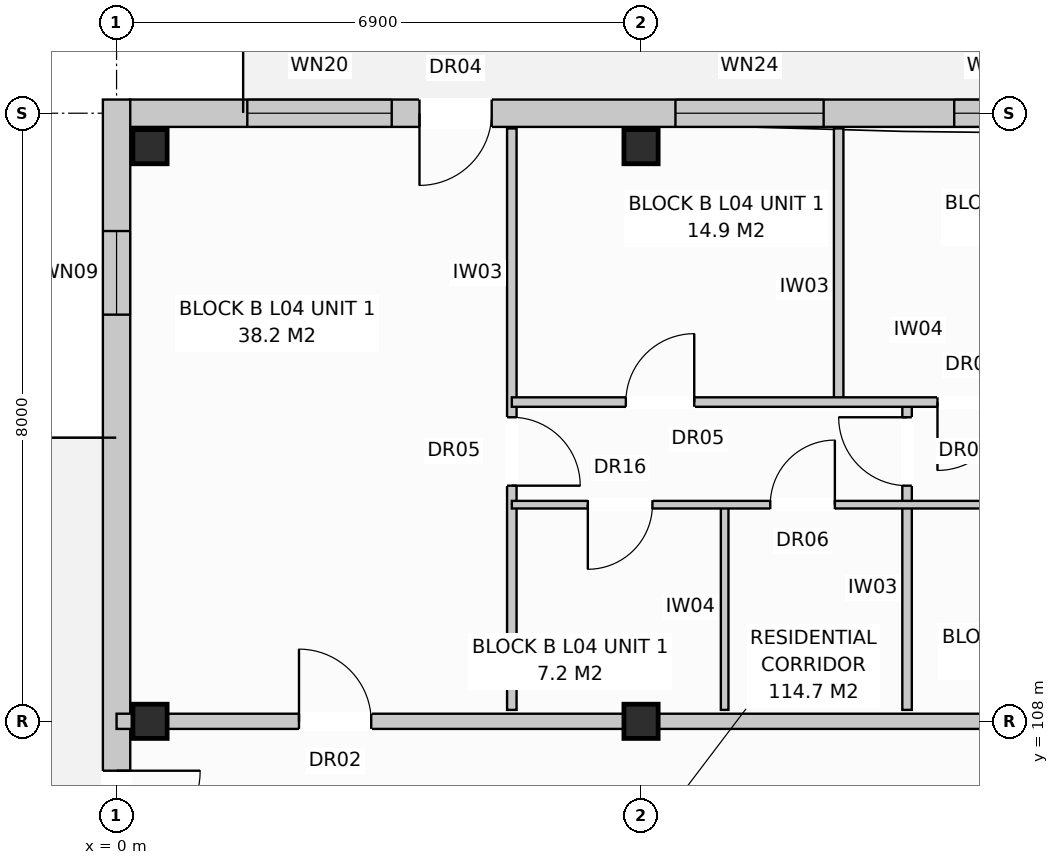
"""IFC4 building model, lengths in metres.
Left out: names, types, materials, properties, quantities, classifications, styles, units other than length and angle.
Written with IfcOpenShell. Run it as: python <this file> out.ifc"""

import sys

from ifc_helpers import new_model, si_unit, direction, frame, frame_2d, origin, origin_with_axes, origin_2d, place, context, subcontext, project, spatial, rectangle, extrude, element, fill, save


model = new_model("IFC4")
c1 = context("Model", 3, precision=1e-05, world=origin(), true_north=direction((0.0, 1.0)))
c2 = subcontext(c1, "Body", "Model", "MODEL_VIEW")
j1 = project(units=[si_unit("LENGTHUNIT", "METRE"), si_unit("PLANEANGLEUNIT", "RADIAN")], contexts=[c1])
p1 = place(None, origin())
s1 = spatial("IfcSite", under=j1, at=p1, CompositionType="ELEMENT")
p2 = place(p1, origin())
s2 = spatial("IfcBuilding", under=s1, at=p2, CompositionType="ELEMENT")
p3 = place(p2, frame((0.0, 0.0, 14.4)))
s3 = spatial("IfcBuildingStorey", under=s2, at=p3, CompositionType="ELEMENT", Elevation=14.4)
for number, where, z_axis, x_axis in (
    (1, (0.44, 108.0, 0.0), (0.0, 0.0, 1.0), (1.0, 0.0, 0.0)),
    (2, (0.44, 115.56, 0.0), (0.0, 0.0, 1.0), (1.0, 0.0, 0.0)),
    (3, (6.9, 108.0, 0.0), (0.0, 0.0, 1.0), (1.0, 0.0, 0.0)),
    (4, (6.9, 115.56, 0.0), (0.0, 0.0, 1.0), (1.0, 0.0, 0.0)),
):
    element("IfcColumn", number, at=place(p3, frame(where, z_axis=z_axis, x_axis=x_axis)), inside=s3, PredefinedType="COLUMN", context=c2, shape_type="SweptSolid", body=[
        extrude(rectangle(XDim=0.45, YDim=0.45, at=origin_2d()), origin(), (0.0, 0.0, 1.0), 3.2),
    ])
p4 = place(p3, frame((0.17, 116.0, 0.0), z_axis=(0.0, 0.0, 1.0), x_axis=(1.0, 0.0, 0.0)))
e5 = element("IfcWall", 5, at=p4, inside=s3, PredefinedType="STANDARD", context=c2, shape_type="SweptSolid", body=[
    extrude(rectangle(XDim=54.86, YDim=0.36, at=frame_2d((27.43, 0.0))), origin(), (0.0, 0.0, 1.0), 2.94),
])
p5 = place(p4, frame((3.815, 0.0, 0.0)))
e6 = element("IfcOpeningElement", 6, at=p5, cuts=e5, PredefinedType="OPENING", context=c2, shape_type="SweptSolid", body=[
    extrude(rectangle(XDim=0.95, YDim=2.1, at=frame_2d((0.475, 1.05))), frame((0.0, 0.192, 0.0), z_axis=(0.0, -1.0, 0.0), x_axis=(1.0, 0.0, 0.0)), (0.0, 0.0, 1.0), 0.384),
])
p6 = place(p4, frame((16.615, 0.0, 0.0)))
e7 = element("IfcOpeningElement", 7, at=p6, cuts=e5, PredefinedType="OPENING", context=c2, shape_type="SweptSolid", body=[
    extrude(rectangle(XDim=0.95, YDim=2.1, at=frame_2d((0.475, 1.05))), frame((0.0, 0.192, 0.0), z_axis=(0.0, -1.0, 0.0), x_axis=(1.0, 0.0, 0.0)), (0.0, 0.0, 1.0), 0.384),
])
p7 = place(p4, frame((30.115, 0.0, 0.0)))
e8 = element("IfcOpeningElement", 8, at=p7, cuts=e5, PredefinedType="OPENING", context=c2, shape_type="SweptSolid", body=[
    extrude(rectangle(XDim=0.95, YDim=2.1, at=frame_2d((0.475, 1.05))), frame((0.0, 0.192, 0.0), z_axis=(0.0, -1.0, 0.0), x_axis=(1.0, 0.0, 0.0)), (0.0, 0.0, 1.0), 0.384),
])
p8 = place(p4, frame((45.228, 0.0, 0.0)))
e9 = element("IfcOpeningElement", 9, at=p8, cuts=e5, PredefinedType="OPENING", context=c2, shape_type="SweptSolid", body=[
    extrude(rectangle(XDim=0.95, YDim=2.1, at=frame_2d((0.475, 1.05))), frame((0.0, 0.192, 0.0), z_axis=(0.0, -1.0, 0.0), x_axis=(1.0, 0.0, 0.0)), (0.0, 0.0, 1.0), 0.384),
])
p9 = place(p4, frame((1.55, 0.0, 0.8)))
e10 = element("IfcOpeningElement", 10, at=p9, cuts=e5, PredefinedType="OPENING", context=c2, shape_type="SweptSolid", body=[
    extrude(rectangle(XDim=1.9, YDim=1.85, at=frame_2d((0.95, 0.925))), frame((0.0, 0.192, 0.0), z_axis=(0.0, -1.0, 0.0), x_axis=(1.0, 0.0, 0.0)), (0.0, 0.0, 1.0), 0.384),
])
p10 = place(p4, frame((7.183, 0.0, 0.8)))
e11 = element("IfcOpeningElement", 11, at=p10, cuts=e5, PredefinedType="OPENING", context=c2, shape_type="SweptSolid", body=[
    extrude(rectangle(XDim=1.95, YDim=1.65, at=frame_2d((0.975, 0.825))), frame((0.0, 0.192, 0.0), z_axis=(0.0, -1.0, 0.0), x_axis=(1.0, 0.0, 0.0)), (0.0, 0.0, 1.0), 0.384),
])
p11 = place(p4, frame((10.85, 0.0, 0.72)))
e12 = element("IfcOpeningElement", 12, at=p11, cuts=e5, PredefinedType="OPENING", context=c2, shape_type="SweptSolid", body=[
    extrude(rectangle(XDim=1.1, YDim=1.5, at=frame_2d((0.55, 0.75))), frame((0.0, 0.192, 0.0), z_axis=(0.0, -1.0, 0.0), x_axis=(1.0, 0.0, 0.0)), (0.0, 0.0, 1.0), 0.384),
])
p12 = place(p4, frame((14.85, 0.0, 0.72)))
e13 = element("IfcOpeningElement", 13, at=p12, cuts=e5, PredefinedType="OPENING", context=c2, shape_type="SweptSolid", body=[
    extrude(rectangle(XDim=1.1, YDim=1.5, at=frame_2d((0.55, 0.75))), frame((0.0, 0.192, 0.0), z_axis=(0.0, -1.0, 0.0), x_axis=(1.0, 0.0, 0.0)), (0.0, 0.0, 1.0), 0.384),
])
p13 = place(p4, frame((18.125, 0.0, 0.8)))
e14 = element("IfcOpeningElement", 14, at=p13, cuts=e5, PredefinedType="OPENING", context=c2, shape_type="SweptSolid", body=[
    extrude(rectangle(XDim=1.95, YDim=1.65, at=frame_2d((0.975, 0.825))), frame((0.0, 0.192, 0.0), z_axis=(0.0, -1.0, 0.0), x_axis=(1.0, 0.0, 0.0)), (0.0, 0.0, 1.0), 0.384),
])
p14 = place(p4, frame((23.9, 0.0, 0.8)))
e15 = element("IfcOpeningElement", 15, at=p14, cuts=e5, PredefinedType="OPENING", context=c2, shape_type="SweptSolid", body=[
    extrude(rectangle(XDim=1.8, YDim=1.7, at=frame_2d((0.9, 0.85))), frame((0.0, 0.192, 0.0), z_axis=(0.0, -1.0, 0.0), x_axis=(1.0, 0.0, 0.0)), (0.0, 0.0, 1.0), 0.384),
])
p15 = place(p4, frame((28.35, 0.0, 0.72)))
e16 = element("IfcOpeningElement", 16, at=p15, cuts=e5, PredefinedType="OPENING", context=c2, shape_type="SweptSolid", body=[
    extrude(rectangle(XDim=1.1, YDim=1.5, at=frame_2d((0.55, 0.75))), frame((0.0, 0.192, 0.0), z_axis=(0.0, -1.0, 0.0), x_axis=(1.0, 0.0, 0.0)), (0.0, 0.0, 1.0), 0.384),
])
p16 = place(p4, frame((31.825, 0.0, 0.8)))
e17 = element("IfcOpeningElement", 17, at=p16, cuts=e5, PredefinedType="OPENING", context=c2, shape_type="SweptSolid", body=[
    extrude(rectangle(XDim=1.95, YDim=1.65, at=frame_2d((0.975, 0.825))), frame((0.0, 0.192, 0.0), z_axis=(0.0, -1.0, 0.0), x_axis=(1.0, 0.0, 0.0)), (0.0, 0.0, 1.0), 0.384),
])
p17 = place(p4, frame((35.4, 0.0, 0.8)))
e18 = element("IfcOpeningElement", 18, at=p17, cuts=e5, PredefinedType="OPENING", context=c2, shape_type="SweptSolid", body=[
    extrude(rectangle(XDim=1.8, YDim=1.7, at=frame_2d((0.9, 0.85))), frame((0.0, 0.192, 0.0), z_axis=(0.0, -1.0, 0.0), x_axis=(1.0, 0.0, 0.0)), (0.0, 0.0, 1.0), 0.384),
])
p18 = place(p4, frame((39.15, 0.0, 0.72)))
e19 = element("IfcOpeningElement", 19, at=p18, cuts=e5, PredefinedType="OPENING", context=c2, shape_type="SweptSolid", body=[
    extrude(rectangle(XDim=1.1, YDim=1.5, at=frame_2d((0.55, 0.75))), frame((0.0, 0.192, 0.0), z_axis=(0.0, -1.0, 0.0), x_axis=(1.0, 0.0, 0.0)), (0.0, 0.0, 1.0), 0.384),
])
p19 = place(p4, frame((43.35, 0.0, 0.72)))
e20 = element("IfcOpeningElement", 20, at=p19, cuts=e5, PredefinedType="OPENING", context=c2, shape_type="SweptSolid", body=[
    extrude(rectangle(XDim=1.1, YDim=1.5, at=frame_2d((0.55, 0.75))), frame((0.0, 0.192, 0.0), z_axis=(0.0, -1.0, 0.0), x_axis=(1.0, 0.0, 0.0)), (0.0, 0.0, 1.0), 0.384),
])
p20 = place(p4, frame((48.7, 0.0, 0.8)))
e21 = element("IfcOpeningElement", 21, at=p20, cuts=e5, PredefinedType="OPENING", context=c2, shape_type="SweptSolid", body=[
    extrude(rectangle(XDim=1.8, YDim=1.7, at=frame_2d((0.9, 0.85))), frame((0.0, 0.192, 0.0), z_axis=(0.0, -1.0, 0.0), x_axis=(1.0, 0.0, 0.0)), (0.0, 0.0, 1.0), 0.384),
])
p21 = place(p4, frame((52.25, 0.0, 0.72)))
e22 = element("IfcOpeningElement", 22, at=p21, cuts=e5, PredefinedType="OPENING", context=c2, shape_type="SweptSolid", body=[
    extrude(rectangle(XDim=1.1, YDim=1.5, at=frame_2d((0.55, 0.75))), frame((0.0, 0.192, 0.0), z_axis=(0.0, -1.0, 0.0), x_axis=(1.0, 0.0, 0.0)), (0.0, 0.0, 1.0), 0.384),
])
p22 = place(p3, frame((0.0, 97.42, 0.0), z_axis=(0.0, 0.0, 1.0), x_axis=(0.0, 1.0, 0.0)))
e23 = element("IfcWall", 23, at=p22, inside=s3, PredefinedType="STANDARD", context=c2, shape_type="SweptSolid", body=[
    extrude(rectangle(XDim=18.76, YDim=0.36, at=frame_2d((9.38, 0.0))), origin(), (0.0, 0.0, 1.0), 2.94),
])
p23 = place(p22, frame((8.83, 0.0, 0.0)))
e24 = element("IfcOpeningElement", 24, at=p23, cuts=e23, PredefinedType="OPENING", context=c2, shape_type="SweptSolid", body=[
    extrude(rectangle(XDim=1.1, YDim=2.1, at=frame_2d((0.55, 1.05))), frame((0.0, 0.192, 0.0), z_axis=(0.0, -1.0, 0.0), x_axis=(1.0, 0.0, 0.0)), (0.0, 0.0, 1.0), 0.384),
])
p24 = place(p22, frame((1.73, 0.0, 0.72)))
e25 = element("IfcOpeningElement", 25, at=p24, cuts=e23, PredefinedType="OPENING", context=c2, shape_type="SweptSolid", body=[
    extrude(rectangle(XDim=1.1, YDim=1.5, at=frame_2d((0.55, 0.75))), frame((0.0, 0.192, 0.0), z_axis=(0.0, -1.0, 0.0), x_axis=(1.0, 0.0, 0.0)), (0.0, 0.0, 1.0), 0.384),
])
p25 = place(p22, frame((15.93, 0.0, 0.72)))
e26 = element("IfcOpeningElement", 26, at=p25, cuts=e23, PredefinedType="OPENING", context=c2, shape_type="SweptSolid", body=[
    extrude(rectangle(XDim=1.1, YDim=1.5, at=frame_2d((0.55, 0.75))), frame((0.0, 0.192, 0.0), z_axis=(0.0, -1.0, 0.0), x_axis=(1.0, 0.0, 0.0)), (0.0, 0.0, 1.0), 0.384),
])
p26 = place(p3, frame((0.0, 108.0, 0.0), z_axis=(0.0, 0.0, 1.0), x_axis=(1.0, 0.0, 0.0)))
e27 = element("IfcWall", 27, at=p26, inside=s3, PredefinedType="PARTITIONING", context=c2, shape_type="SweptSolid", body=[
    extrude(rectangle(XDim=13.8, YDim=0.2, at=frame_2d((6.9, 0.0))), origin(), (0.0, 0.0, 1.0), 2.38),
])
p27 = place(p26, frame((2.4, 0.0, 0.0)))
e28 = element("IfcOpeningElement", 28, at=p27, cuts=e27, PredefinedType="OPENING", context=c2, shape_type="SweptSolid", body=[
    extrude(rectangle(XDim=0.95, YDim=2.15, at=frame_2d((0.475, 1.075))), frame((0.0, 0.112, 0.0), z_axis=(0.0, -1.0, 0.0), x_axis=(1.0, 0.0, 0.0)), (0.0, 0.0, 1.0), 0.224),
])
p28 = place(p3, frame((5.2, 108.15, 0.0), z_axis=(0.0, 0.0, 1.0), x_axis=(0.0, 1.0, 0.0)))
e29 = element("IfcWall", 29, at=p28, inside=s3, PredefinedType="PARTITIONING", context=c2, shape_type="SweptSolid", body=[
    extrude(rectangle(XDim=7.65, YDim=0.125, at=frame_2d((3.825, 0.0))), origin(), (0.0, 0.0, 1.0), 2.94),
])
p29 = place(p28, frame((2.95, 0.0, 0.0)))
e30 = element("IfcOpeningElement", 30, at=p29, cuts=e29, PredefinedType="OPENING", context=c2, shape_type="SweptSolid", body=[
    extrude(rectangle(XDim=0.9, YDim=2.1, at=frame_2d((0.45, 1.05))), frame((0.0, 0.074, 0.0), z_axis=(0.0, -1.0, 0.0), x_axis=(1.0, 0.0, 0.0)), (0.0, 0.0, 1.0), 0.149),
])
p30 = place(p3, frame((8.0, 108.15, 0.0), z_axis=(0.0, 0.0, 1.0), x_axis=(0.0, 1.0, 0.0)))
e31 = element("IfcWall", 31, at=p30, inside=s3, PredefinedType="PARTITIONING", context=c2, shape_type="SweptSolid", body=[
    extrude(rectangle(XDim=2.7, YDim=0.1, at=frame_2d((1.35, 0.0))), origin(), (0.0, 0.0, 1.0), 2.94),
])
p31 = place(p3, frame((10.4, 108.15, 0.0), z_axis=(0.0, 0.0, 1.0), x_axis=(0.0, 1.0, 0.0)))
e32 = element("IfcWall", 32, at=p31, inside=s3, PredefinedType="PARTITIONING", context=c2, shape_type="SweptSolid", body=[
    extrude(rectangle(XDim=4.05, YDim=0.125, at=frame_2d((2.025, 0.0))), origin(), (0.0, 0.0, 1.0), 2.94),
])
p32 = place(p31, frame((2.95, 0.0, 0.0)))
e33 = element("IfcOpeningElement", 33, at=p32, cuts=e32, PredefinedType="OPENING", context=c2, shape_type="SweptSolid", body=[
    extrude(rectangle(XDim=0.9, YDim=2.1, at=frame_2d((0.45, 1.05))), frame((0.0, 0.074, 0.0), z_axis=(0.0, -1.0, 0.0), x_axis=(1.0, 0.0, 0.0)), (0.0, 0.0, 1.0), 0.149),
])
p33 = place(p3, frame((9.5, 112.2, 0.0), z_axis=(0.0, 0.0, 1.0), x_axis=(0.0, 1.0, 0.0)))
e34 = element("IfcWall", 34, at=p33, inside=s3, PredefinedType="PARTITIONING", context=c2, shape_type="SweptSolid", body=[
    extrude(rectangle(XDim=3.6, YDim=0.125, at=frame_2d((1.8, 0.0))), origin(), (0.0, 0.0, 1.0), 2.94),
])
p34 = place(p3, frame((5.2, 110.85, 0.0), z_axis=(0.0, 0.0, 1.0), x_axis=(1.0, 0.0, 0.0)))
e35 = element("IfcWall", 35, at=p34, inside=s3, PredefinedType="PARTITIONING", context=c2, shape_type="SweptSolid", body=[
    extrude(rectangle(XDim=8.5, YDim=0.1, at=frame_2d((4.25, 0.0))), origin(), (0.0, 0.0, 1.0), 2.94),
])
p35 = place(p34, frame((1.0, 0.0, 0.0)))
e36 = element("IfcOpeningElement", 36, at=p35, cuts=e35, PredefinedType="OPENING", context=c2, shape_type="SweptSolid", body=[
    extrude(rectangle(XDim=0.85, YDim=2.1, at=frame_2d((0.425, 1.05))), frame((0.0, 0.062, 0.0), z_axis=(0.0, -1.0, 0.0), x_axis=(1.0, 0.0, 0.0)), (0.0, 0.0, 1.0), 0.124),
])
p36 = place(p34, frame((3.4, 0.0, 0.0)))
e37 = element("IfcOpeningElement", 37, at=p36, cuts=e35, PredefinedType="OPENING", context=c2, shape_type="SweptSolid", body=[
    extrude(rectangle(XDim=0.85, YDim=2.05, at=frame_2d((0.425, 1.025))), frame((0.0, 0.062, 0.0), z_axis=(0.0, -1.0, 0.0), x_axis=(1.0, 0.0, 0.0)), (0.0, 0.0, 1.0), 0.124),
])
p37 = place(p34, frame((6.2, 0.0, 0.0)))
e38 = element("IfcOpeningElement", 38, at=p37, cuts=e35, PredefinedType="OPENING", context=c2, shape_type="SweptSolid", body=[
    extrude(rectangle(XDim=0.85, YDim=2.05, at=frame_2d((0.425, 1.025))), frame((0.0, 0.062, 0.0), z_axis=(0.0, -1.0, 0.0), x_axis=(1.0, 0.0, 0.0)), (0.0, 0.0, 1.0), 0.124),
])
p38 = place(p3, frame((5.2, 112.2, 0.0), z_axis=(0.0, 0.0, 1.0), x_axis=(1.0, 0.0, 0.0)))
e39 = element("IfcWall", 39, at=p38, inside=s3, PredefinedType="PARTITIONING", context=c2, shape_type="SweptSolid", body=[
    extrude(rectangle(XDim=8.5, YDim=0.125, at=frame_2d((4.25, 0.0))), origin(), (0.0, 0.0, 1.0), 2.94),
])
p39 = place(p38, frame((1.5, 0.0, 0.0)))
e40 = element("IfcOpeningElement", 40, at=p39, cuts=e39, PredefinedType="OPENING", context=c2, shape_type="SweptSolid", body=[
    extrude(rectangle(XDim=0.9, YDim=2.1, at=frame_2d((0.45, 1.05))), frame((0.0, 0.074, 0.0), z_axis=(0.0, -1.0, 0.0), x_axis=(1.0, 0.0, 0.0)), (0.0, 0.0, 1.0), 0.149),
])
p40 = place(p38, frame((5.6, 0.0, 0.0)))
e41 = element("IfcOpeningElement", 41, at=p40, cuts=e39, PredefinedType="OPENING", context=c2, shape_type="SweptSolid", body=[
    extrude(rectangle(XDim=0.9, YDim=2.1, at=frame_2d((0.45, 1.05))), frame((0.0, 0.074, 0.0), z_axis=(0.0, -1.0, 0.0), x_axis=(1.0, 0.0, 0.0)), (0.0, 0.0, 1.0), 0.149),
])
p41 = place(p5, frame((0.95, 0.0, 0.0), z_axis=(0.0, 0.0, 1.0), x_axis=(-1.0, 0.0, 0.0)))
e42 = element("IfcDoor", 42, at=p41, inside=s3, OperationType="SINGLE_SWING_LEFT", PredefinedType="DOOR", context=c2, shape_type="SweptSolid", body=[
    extrude(rectangle(XDim=0.95, YDim=2.1, at=frame_2d((0.475, 1.05))), frame((0.0, 0.025, 0.0), z_axis=(0.0, -1.0, 0.0), x_axis=(1.0, 0.0, 0.0)), (0.0, 0.0, 1.0), 0.05),
])
fill(e6, e42)
p42 = place(p9, origin_with_axes())
e43 = element("IfcWindow", 43, at=p42, inside=s3, PartitioningType="SINGLE_PANEL", PredefinedType="WINDOW", context=c2, shape_type="SweptSolid", body=[
    extrude(rectangle(XDim=1.9, YDim=1.85, at=frame_2d((0.95, 0.925))), frame((0.0, 0.03, 0.0), z_axis=(0.0, -1.0, 0.0), x_axis=(1.0, 0.0, 0.0)), (0.0, 0.0, 1.0), 0.06),
])
fill(e10, e43)
p43 = place(p10, origin_with_axes())
e44 = element("IfcWindow", 44, at=p43, inside=s3, PartitioningType="SINGLE_PANEL", PredefinedType="WINDOW", context=c2, shape_type="SweptSolid", body=[
    extrude(rectangle(XDim=1.95, YDim=1.65, at=frame_2d((0.975, 0.825))), frame((0.0, 0.03, 0.0), z_axis=(0.0, -1.0, 0.0), x_axis=(1.0, 0.0, 0.0)), (0.0, 0.0, 1.0), 0.06),
])
fill(e11, e44)
p44 = place(p11, origin_with_axes())
e45 = element("IfcWindow", 45, at=p44, inside=s3, PartitioningType="SINGLE_PANEL", PredefinedType="WINDOW", context=c2, shape_type="SweptSolid", body=[
    extrude(rectangle(XDim=1.1, YDim=1.5, at=frame_2d((0.55, 0.75))), frame((0.0, 0.03, 0.0), z_axis=(0.0, -1.0, 0.0), x_axis=(1.0, 0.0, 0.0)), (0.0, 0.0, 1.0), 0.06),
])
fill(e12, e45)
p45 = place(p23, frame((1.1, 0.0, 0.0), z_axis=(0.0, 0.0, 1.0), x_axis=(-1.0, 0.0, 0.0)))
e46 = element("IfcDoor", 46, at=p45, inside=s3, OperationType="SINGLE_SWING_RIGHT", PredefinedType="DOOR", context=c2, shape_type="SweptSolid", body=[
    extrude(rectangle(XDim=1.1, YDim=2.1, at=frame_2d((0.55, 1.05))), frame((0.0, 0.025, 0.0), z_axis=(0.0, -1.0, 0.0), x_axis=(1.0, 0.0, 0.0)), (0.0, 0.0, 1.0), 0.05),
])
fill(e24, e46)
p46 = place(p25, origin_with_axes())
e47 = element("IfcWindow", 47, at=p46, inside=s3, PartitioningType="SINGLE_PANEL", PredefinedType="WINDOW", context=c2, shape_type="SweptSolid", body=[
    extrude(rectangle(XDim=1.1, YDim=1.5, at=frame_2d((0.55, 0.75))), frame((0.0, 0.03, 0.0), z_axis=(0.0, -1.0, 0.0), x_axis=(1.0, 0.0, 0.0)), (0.0, 0.0, 1.0), 0.06),
])
fill(e26, e47)
p47 = place(p27, origin_with_axes())
e48 = element("IfcDoor", 48, at=p47, inside=s3, OperationType="SINGLE_SWING_LEFT", PredefinedType="DOOR", context=c2, shape_type="SweptSolid", body=[
    extrude(rectangle(XDim=0.95, YDim=2.15, at=frame_2d((0.475, 1.075))), frame((0.0, 0.025, 0.0), z_axis=(0.0, -1.0, 0.0), x_axis=(1.0, 0.0, 0.0)), (0.0, 0.0, 1.0), 0.05),
])
fill(e28, e48)
p48 = place(p29, frame((0.9, 0.0, 0.0), z_axis=(0.0, 0.0, 1.0), x_axis=(-1.0, 0.0, 0.0)))
e49 = element("IfcDoor", 49, at=p48, inside=s3, OperationType="SINGLE_SWING_LEFT", PredefinedType="DOOR", context=c2, shape_type="SweptSolid", body=[
    extrude(rectangle(XDim=0.9, YDim=2.1, at=frame_2d((0.45, 1.05))), frame((0.0, 0.025, 0.0), z_axis=(0.0, -1.0, 0.0), x_axis=(1.0, 0.0, 0.0)), (0.0, 0.0, 1.0), 0.05),
])
fill(e30, e49)
p49 = place(p32, origin_with_axes())
e50 = element("IfcDoor", 50, at=p49, inside=s3, OperationType="SINGLE_SWING_RIGHT", PredefinedType="DOOR", context=c2, shape_type="SweptSolid", body=[
    extrude(rectangle(XDim=0.9, YDim=2.1, at=frame_2d((0.45, 1.05))), frame((0.0, 0.025, 0.0), z_axis=(0.0, -1.0, 0.0), x_axis=(1.0, 0.0, 0.0)), (0.0, 0.0, 1.0), 0.05),
])
fill(e33, e50)
p50 = place(p35, frame((0.85, 0.0, 0.0), z_axis=(0.0, 0.0, 1.0), x_axis=(-1.0, 0.0, 0.0)))
e51 = element("IfcDoor", 51, at=p50, inside=s3, OperationType="SINGLE_SWING_LEFT", PredefinedType="DOOR", context=c2, shape_type="SweptSolid", body=[
    extrude(rectangle(XDim=0.85, YDim=2.1, at=frame_2d((0.425, 1.05))), frame((0.0, 0.025, 0.0), z_axis=(0.0, -1.0, 0.0), x_axis=(1.0, 0.0, 0.0)), (0.0, 0.0, 1.0), 0.05),
])
fill(e36, e51)
p51 = place(p36, origin_with_axes())
e52 = element("IfcDoor", 52, at=p51, inside=s3, OperationType="SINGLE_SWING_RIGHT", PredefinedType="DOOR", context=c2, shape_type="SweptSolid", body=[
    extrude(rectangle(XDim=0.85, YDim=2.05, at=frame_2d((0.425, 1.025))), frame((0.0, 0.025, 0.0), z_axis=(0.0, -1.0, 0.0), x_axis=(1.0, 0.0, 0.0)), (0.0, 0.0, 1.0), 0.05),
])
fill(e37, e52)
p52 = place(p39, origin_with_axes())
e53 = element("IfcDoor", 53, at=p52, inside=s3, OperationType="SINGLE_SWING_RIGHT", PredefinedType="DOOR", context=c2, shape_type="SweptSolid", body=[
    extrude(rectangle(XDim=0.9, YDim=2.1, at=frame_2d((0.45, 1.05))), frame((0.0, 0.025, 0.0), z_axis=(0.0, -1.0, 0.0), x_axis=(1.0, 0.0, 0.0)), (0.0, 0.0, 1.0), 0.05),
])
fill(e40, e53)
p53 = place(p40, frame((0.9, 0.0, 0.0), z_axis=(0.0, 0.0, 1.0), x_axis=(-1.0, 0.0, 0.0)))
e54 = element("IfcDoor", 54, at=p53, inside=s3, OperationType="SINGLE_SWING_LEFT", PredefinedType="DOOR", context=c2, shape_type="SweptSolid", body=[
    extrude(rectangle(XDim=0.9, YDim=2.1, at=frame_2d((0.45, 1.05))), frame((0.0, 0.025, 0.0), z_axis=(0.0, -1.0, 0.0), x_axis=(1.0, 0.0, 0.0)), (0.0, 0.0, 1.0), 0.05),
])
fill(e41, e54)
save(model, sys.argv[1])
